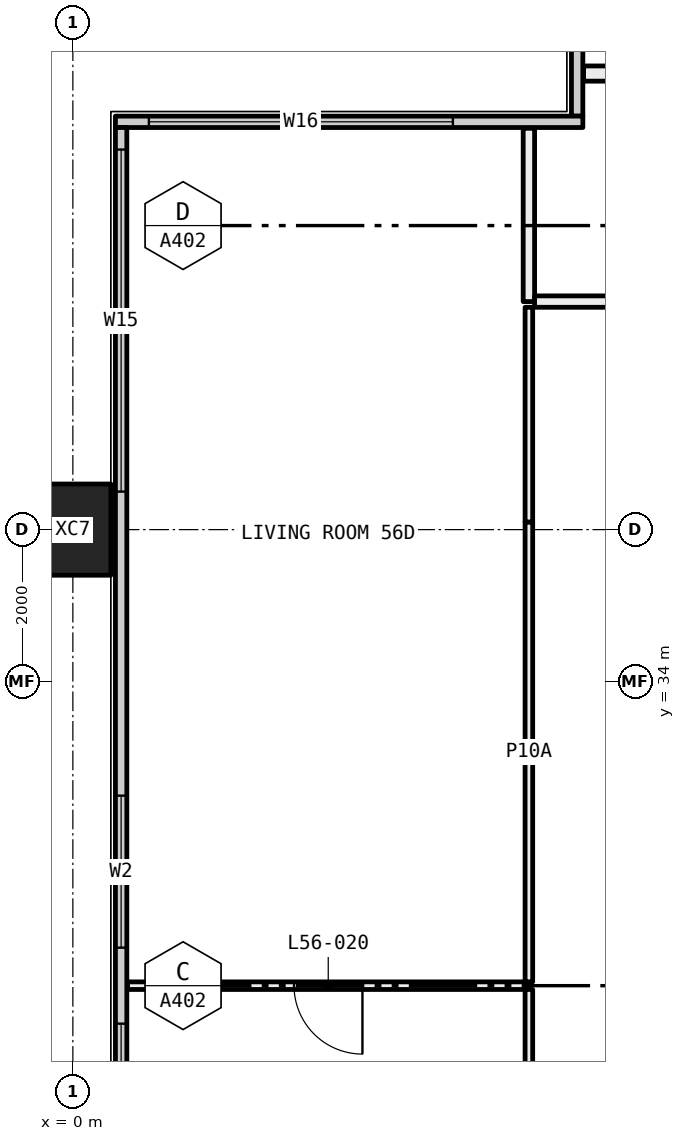
"""IFC4 building model, lengths in metres.
Left out: names, types, materials, properties, quantities, classifications, styles, units other than length and angle.
Written with IfcOpenShell. Run it as: python <this file> out.ifc"""

import sys

from ifc_helpers import new_model, si_unit, direction, frame, frame_2d, origin, origin_2d, place, context, subcontext, project, spatial, rectangle, hollow_rectangle, extrude, element, fill, save


model = new_model("IFC4")
c1 = context("Model", 3, precision=1e-05, world=origin(), true_north=direction((0.0, 1.0)))
c2 = subcontext(c1, "Body", "Model", "MODEL_VIEW")
j1 = project(units=[si_unit("LENGTHUNIT", "METRE"), si_unit("PLANEANGLEUNIT", "RADIAN")], contexts=[c1])
p1 = place(None, origin())
s1 = spatial("IfcSite", under=j1, at=p1, CompositionType="ELEMENT")
p2 = place(p1, origin())
s2 = spatial("IfcBuilding", under=s1, at=p2, CompositionType="ELEMENT")
p3 = place(p2, frame((0.0, 0.0, 210.0)))
s3 = spatial("IfcBuildingStorey", under=s2, at=p3, CompositionType="ELEMENT", Elevation=210.0)
p4 = place(p3, frame((0.0, 36.0, -0.4), z_axis=(0.0, 0.0, 1.0), x_axis=(0.0, 1.0, 0.0)))
e1 = element("IfcColumn", 1, at=p4, inside=s3, PredefinedType="COLUMN", context=c2, shape_type="SweptSolid", body=[
    extrude(hollow_rectangle(XDim=1.2, YDim=1.0, WallThickness=0.045, at=origin_2d()), origin(), (0.0, 0.0, 1.0), 3.45),
])
p5 = place(p3, frame((6.635, 41.44, 0.0), z_axis=(0.0, 0.0, 1.0), x_axis=(0.0, 1.0, 0.0)))
e2 = element("IfcWall", 2, at=p5, inside=s3, PredefinedType="ELEMENTEDWALL", context=c2, shape_type="SweptSolid", body=[
    extrude(rectangle(XDim=5.85, YDim=0.15, at=frame_2d((2.925, 0.0))), origin(), (0.0, 0.0, 1.0), 3.05),
])
p6 = place(p5, frame((1.56, 0.0, 0.45)))
e3 = element("IfcOpeningElement", 3, at=p6, cuts=e2, PredefinedType="OPENING", context=c2, shape_type="SweptSolid", body=[
    extrude(rectangle(XDim=4.0, YDim=2.55, at=frame_2d((2.0, 1.275))), frame((0.0, 0.085, 0.0), z_axis=(0.0, -1.0, 0.0), x_axis=(1.0, 0.0, 0.0)), (0.0, 0.0, 1.0), 0.17),
])
p7 = place(p3, frame((0.56, 41.365, 0.0), z_axis=(0.0, 0.0, 1.0), x_axis=(1.0, 0.0, 0.0)))
e4 = element("IfcWall", 4, at=p7, inside=s3, PredefinedType="ELEMENTEDWALL", context=c2, shape_type="SweptSolid", body=[
    extrude(rectangle(XDim=6.15, YDim=0.15, at=frame_2d((3.075, 0.0))), origin(), (0.0, 0.0, 1.0), 3.05),
])
p8 = place(p7, frame((0.44, 0.0, 0.45)))
e5 = element("IfcOpeningElement", 5, at=p8, cuts=e4, PredefinedType="OPENING", context=c2, shape_type="SweptSolid", body=[
    extrude(rectangle(XDim=4.0, YDim=2.55, at=frame_2d((2.0, 1.275))), frame((0.0, 0.085, 0.0), z_axis=(0.0, -1.0, 0.0), x_axis=(1.0, 0.0, 0.0)), (0.0, 0.0, 1.0), 0.17),
])
p9 = place(p3, frame((0.635, 18.71, 0.0), z_axis=(0.0, 0.0, 1.0), x_axis=(0.0, 1.0, 0.0)))
e6 = element("IfcWall", 6, at=p9, inside=s3, PredefinedType="ELEMENTEDWALL", context=c2, shape_type="SweptSolid", body=[
    extrude(rectangle(XDim=22.58, YDim=0.15, at=frame_2d((11.29, 0.0))), origin(), (0.0, 0.0, 1.0), 3.05),
])
p10 = place(p9, frame((0.29, 0.0, 0.45)))
e7 = element("IfcOpeningElement", 7, at=p10, cuts=e6, PredefinedType="OPENING", context=c2, shape_type="SweptSolid", body=[
    extrude(rectangle(XDim=4.5, YDim=2.55, at=frame_2d((2.25, 1.275))), frame((0.0, 0.085, 0.0), z_axis=(0.0, -1.0, 0.0), x_axis=(1.0, 0.0, 0.0)), (0.0, 0.0, 1.0), 0.17),
])
p11 = place(p9, frame((7.29, 0.0, 0.45)))
e8 = element("IfcOpeningElement", 8, at=p11, cuts=e6, PredefinedType="OPENING", context=c2, shape_type="SweptSolid", body=[
    extrude(rectangle(XDim=3.5, YDim=2.55, at=frame_2d((1.75, 1.275))), frame((0.0, 0.085, 0.0), z_axis=(0.0, -1.0, 0.0), x_axis=(1.0, 0.0, 0.0)), (0.0, 0.0, 1.0), 0.17),
])
p12 = place(p9, frame((11.79, 0.0, 0.45)))
e9 = element("IfcOpeningElement", 9, at=p12, cuts=e6, PredefinedType="OPENING", context=c2, shape_type="SweptSolid", body=[
    extrude(rectangle(XDim=2.0, YDim=2.55, at=frame_2d((1.0, 1.275))), frame((0.0, 0.085, 0.0), z_axis=(0.0, -1.0, 0.0), x_axis=(1.0, 0.0, 0.0)), (0.0, 0.0, 1.0), 0.17),
])
p13 = place(p9, frame((17.79, 0.0, 0.45)))
e10 = element("IfcOpeningElement", 10, at=p13, cuts=e6, PredefinedType="OPENING", context=c2, shape_type="SweptSolid", body=[
    extrude(rectangle(XDim=4.5, YDim=2.55, at=frame_2d((2.25, 1.275))), frame((0.0, 0.085, 0.0), z_axis=(0.0, -1.0, 0.0), x_axis=(1.0, 0.0, 0.0)), (0.0, 0.0, 1.0), 0.17),
])
p14 = place(p3, frame((6.72, 42.0, 0.0), z_axis=(0.0, 0.0, 1.0), x_axis=(1.0, 0.0, 0.0)))
e11 = element("IfcWall", 11, at=p14, inside=s3, PredefinedType="PARTITIONING", context=c2, shape_type="SweptSolid", body=[
    extrude(rectangle(XDim=3.38, YDim=0.2, at=frame_2d((1.69, 0.0))), origin(), (0.0, 0.0, 1.0), 3.05),
])
p15 = place(p3, frame((6.0, 30.0, 0.0), z_axis=(0.0, 0.0, 1.0), x_axis=(-1.0, 0.0, 0.0)))
e12 = element("IfcWall", 12, at=p15, inside=s3, PredefinedType="PARTITIONING", context=c2, shape_type="SweptSolid", body=[
    extrude(rectangle(XDim=5.28, YDim=0.1, at=frame_2d((2.64, 0.0))), origin(), (0.0, 0.0, 1.0), 3.05),
])
p16 = place(p15, frame((2.19, 0.0, 0.0)))
e13 = element("IfcOpeningElement", 13, at=p16, cuts=e12, PredefinedType="OPENING", context=c2, shape_type="SweptSolid", body=[
    extrude(rectangle(XDim=0.9, YDim=2.1, at=frame_2d((0.45, 1.05))), frame((0.0, 0.06, 0.0), z_axis=(0.0, -1.0, 0.0), x_axis=(1.0, 0.0, 0.0)), (0.0, 0.0, 1.0), 0.12),
])
p17 = place(p3, frame((6.0, 25.5, 0.0), z_axis=(0.0, 0.0, 1.0), x_axis=(0.0, 1.0, 0.0)))
e14 = element("IfcWall", 14, at=p17, inside=s3, PredefinedType="PARTITIONING", context=c2, shape_type="SweptSolid", body=[
    extrude(rectangle(XDim=4.45, YDim=0.1, at=frame_2d((2.225, 0.0))), origin(), (0.0, 0.0, 1.0), 3.05),
])
p18 = place(p3, frame((6.0, 30.05, 0.0), z_axis=(0.0, 0.0, 1.0), x_axis=(0.0, 1.0, 0.0)))
e15 = element("IfcWall", 15, at=p18, inside=s3, PredefinedType="PARTITIONING", context=c2, shape_type="SweptSolid", body=[
    extrude(rectangle(XDim=6.05, YDim=0.1, at=frame_2d((3.025, 0.0))), origin(), (0.0, 0.0, 1.0), 2.45),
])
p19 = place(p3, frame((6.0, 36.1, 0.0), z_axis=(0.0, 0.0, 1.0), x_axis=(0.0, 1.0, 0.0)))
e16 = element("IfcWall", 16, at=p19, inside=s3, PredefinedType="PARTITIONING", context=c2, shape_type="SweptSolid", body=[
    extrude(rectangle(XDim=2.825, YDim=0.1, at=frame_2d((1.413, 0.0))), origin(), (0.0, 0.0, 1.0), 3.05),
])
p20 = place(p3, frame((6.0, 39.0, 0.0), z_axis=(0.0, 0.0, 1.0), x_axis=(0.0, 1.0, 0.0)))
e17 = element("IfcWall", 17, at=p20, inside=s3, PredefinedType="PARTITIONING", context=c2, shape_type="SweptSolid", body=[
    extrude(rectangle(XDim=2.28, YDim=0.15, at=frame_2d((1.14, 0.0))), origin(), (0.0, 0.0, 1.0), 3.05),
])
p21 = place(p3, frame((10.0, 39.0, 0.0), z_axis=(0.0, 0.0, 1.0), x_axis=(-1.0, 0.0, 0.0)))
e18 = element("IfcWall", 18, at=p21, inside=s3, PredefinedType="PARTITIONING", context=c2, shape_type="SweptSolid", body=[
    extrude(rectangle(XDim=3.925, YDim=0.15, at=frame_2d((1.962, 0.0))), origin(), (0.0, 0.0, 1.0), 3.05),
])
p22 = place(p21, frame((1.512, 0.0, 0.0)))
e19 = element("IfcOpeningElement", 19, at=p22, cuts=e18, PredefinedType="OPENING", context=c2, shape_type="SweptSolid", body=[
    extrude(rectangle(XDim=0.9, YDim=2.1, at=frame_2d((0.45, 1.05))), frame((0.0, 0.085, 0.0), z_axis=(0.0, -1.0, 0.0), x_axis=(1.0, 0.0, 0.0)), (0.0, 0.0, 1.0), 0.17),
])
p23 = place(p8, origin())
e20 = element("IfcWindow", 20, at=p23, inside=s3, PartitioningType="SINGLE_PANEL", PredefinedType="WINDOW", context=c2, shape_type="SweptSolid", body=[
    extrude(rectangle(XDim=4.0, YDim=2.55, at=frame_2d((2.0, 1.275))), frame((0.0, 0.03, 0.0), z_axis=(0.0, -1.0, 0.0), x_axis=(1.0, 0.0, 0.0)), (0.0, 0.0, 1.0), 0.06),
])
fill(e5, e20)
p24 = place(p11, origin())
e21 = element("IfcWindow", 21, at=p24, inside=s3, PartitioningType="SINGLE_PANEL", PredefinedType="WINDOW", context=c2, shape_type="SweptSolid", body=[
    extrude(rectangle(XDim=3.5, YDim=2.55, at=frame_2d((1.75, 1.275))), frame((0.0, 0.03, 0.0), z_axis=(0.0, -1.0, 0.0), x_axis=(1.0, 0.0, 0.0)), (0.0, 0.0, 1.0), 0.06),
])
fill(e8, e21)
p25 = place(p12, origin())
e22 = element("IfcWindow", 22, at=p25, inside=s3, PartitioningType="SINGLE_PANEL", PredefinedType="WINDOW", context=c2, shape_type="SweptSolid", body=[
    extrude(rectangle(XDim=2.0, YDim=2.55, at=frame_2d((1.0, 1.275))), frame((0.0, 0.03, 0.0), z_axis=(0.0, -1.0, 0.0), x_axis=(1.0, 0.0, 0.0)), (0.0, 0.0, 1.0), 0.06),
])
fill(e9, e22)
p26 = place(p13, origin())
e23 = element("IfcWindow", 23, at=p26, inside=s3, PartitioningType="SINGLE_PANEL", PredefinedType="WINDOW", context=c2, shape_type="SweptSolid", body=[
    extrude(rectangle(XDim=4.5, YDim=2.55, at=frame_2d((2.25, 1.275))), frame((0.0, 0.03, 0.0), z_axis=(0.0, -1.0, 0.0), x_axis=(1.0, 0.0, 0.0)), (0.0, 0.0, 1.0), 0.06),
])
fill(e10, e23)
p27 = place(p16, origin())
e24 = element("IfcDoor", 24, at=p27, inside=s3, OperationType="SINGLE_SWING_RIGHT", PredefinedType="DOOR", context=c2, shape_type="SweptSolid", body=[
    extrude(rectangle(XDim=0.9, YDim=2.1, at=frame_2d((0.45, 1.05))), frame((0.0, 0.025, 0.0), z_axis=(0.0, -1.0, 0.0), x_axis=(1.0, 0.0, 0.0)), (0.0, 0.0, 1.0), 0.05),
])
fill(e13, e24)
save(model, sys.argv[1])
